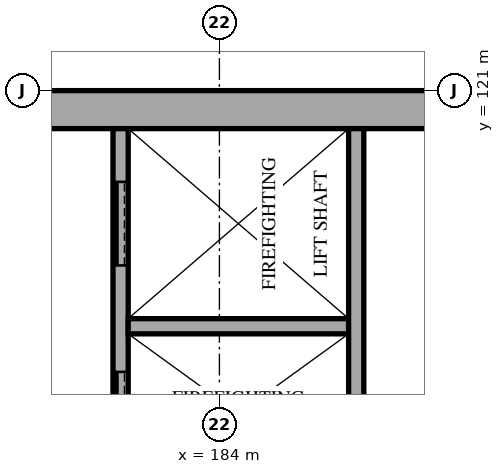
"""IFC4 building model, lengths in metres.
Left out: names, types, materials, properties, quantities, classifications, styles, units other than length and angle.
Written with IfcOpenShell. Run it as: python <this file> out.ifc"""

import sys

from ifc_helpers import new_model, si_unit, direction, frame, frame_2d, origin, place, context, subcontext, project, spatial, rectangle, extrude, element, fill, save


model = new_model("IFC4")
c1 = context("Model", 3, precision=1e-05, world=origin(), true_north=direction((0.0, 1.0)))
c2 = subcontext(c1, "Body", "Model", "MODEL_VIEW")
j1 = project(units=[si_unit("LENGTHUNIT", "METRE"), si_unit("PLANEANGLEUNIT", "RADIAN")], contexts=[c1])
p1 = place(None, origin())
s1 = spatial("IfcSite", under=j1, at=p1, CompositionType="ELEMENT")
p2 = place(p1, origin())
s2 = spatial("IfcBuilding", under=s1, at=p2, CompositionType="ELEMENT")
p3 = place(p2, origin())
s3 = spatial("IfcBuildingStorey", under=s2, at=p3, CompositionType="ELEMENT", Elevation=0.0)
p4 = place(p3, frame((172.0, 120.75, 0.0), z_axis=(0.0, 0.0, 1.0), x_axis=(1.0, 0.0, 0.0)))
e1 = element("IfcWall", 1, at=p4, inside=s3, PredefinedType="SHEAR", context=c2, shape_type="SweptSolid", body=[
    extrude(rectangle(XDim=18.0, YDim=0.5, at=frame_2d((9.0, 0.0))), origin(), (0.0, 0.0, 1.0), 5.0),
])
p5 = place(p4, frame((8.3, 0.0, 0.0)))
e2 = element("IfcOpeningElement", 2, at=p5, cuts=e1, PredefinedType="OPENING", context=c2, shape_type="SweptSolid", body=[
    extrude(rectangle(XDim=1.2, YDim=2.1, at=frame_2d((0.6, 1.05))), frame((0.0, 0.26, 0.0), z_axis=(0.0, -1.0, 0.0), x_axis=(1.0, 0.0, 0.0)), (0.0, 0.0, 1.0), 0.52),
])
p6 = place(p4, frame((15.2, 0.0, 0.0)))
e3 = element("IfcOpeningElement", 3, at=p6, cuts=e1, PredefinedType="OPENING", context=c2, shape_type="SweptSolid", body=[
    extrude(rectangle(XDim=1.0, YDim=2.1, at=frame_2d((0.5, 1.05))), frame((0.0, 0.26, 0.0), z_axis=(0.0, -1.0, 0.0), x_axis=(1.0, 0.0, 0.0)), (0.0, 0.0, 1.0), 0.52),
])
p7 = place(p3, frame((182.7, 115.7, 0.0), z_axis=(0.0, 0.0, 1.0), x_axis=(0.0, 1.0, 0.0)))
e4 = element("IfcWall", 4, at=p7, inside=s3, PredefinedType="SOLIDWALL", context=c2, shape_type="SweptSolid", body=[
    extrude(rectangle(XDim=4.8, YDim=0.2, at=frame_2d((2.4, 0.0))), origin(), (0.0, 0.0, 1.0), 4.8),
])
p8 = place(p7, frame((0.5, 0.0, 0.0)))
e5 = element("IfcOpeningElement", 5, at=p8, cuts=e4, PredefinedType="OPENING", context=c2, shape_type="SweptSolid", body=[
    extrude(rectangle(XDim=1.1, YDim=2.1, at=frame_2d((0.55, 1.05))), frame((0.0, 0.11, 0.0), z_axis=(0.0, -1.0, 0.0), x_axis=(1.0, 0.0, 0.0)), (0.0, 0.0, 1.0), 0.22),
])
p9 = place(p7, frame((3.0, 0.0, 0.0)))
e6 = element("IfcOpeningElement", 6, at=p9, cuts=e4, PredefinedType="OPENING", context=c2, shape_type="SweptSolid", body=[
    extrude(rectangle(XDim=1.1, YDim=2.1, at=frame_2d((0.55, 1.05))), frame((0.0, 0.11, 0.0), z_axis=(0.0, -1.0, 0.0), x_axis=(1.0, 0.0, 0.0)), (0.0, 0.0, 1.0), 0.22),
])
p10 = place(p3, frame((182.8, 117.9, 0.0), z_axis=(0.0, 0.0, 1.0), x_axis=(1.0, 0.0, 0.0)))
e7 = element("IfcWall", 7, at=p10, inside=s3, PredefinedType="SOLIDWALL", context=c2, shape_type="SweptSolid", body=[
    extrude(rectangle(XDim=2.9, YDim=0.2, at=frame_2d((1.45, 0.0))), origin(), (0.0, 0.0, 1.0), 4.8),
])
p11 = place(p3, frame((185.8, 115.7, 0.0), z_axis=(0.0, 0.0, 1.0), x_axis=(0.0, 1.0, 0.0)))
e8 = element("IfcWall", 8, at=p11, inside=s3, PredefinedType="SOLIDWALL", context=c2, shape_type="SweptSolid", body=[
    extrude(rectangle(XDim=4.8, YDim=0.2, at=frame_2d((2.4, 0.0))), origin(), (0.0, 0.0, 1.0), 4.8),
])
p12 = place(p8, origin())
e9 = element("IfcDoor", 9, at=p12, inside=s3, OperationType="SLIDING_TO_LEFT", PredefinedType="DOOR", context=c2, shape_type="SweptSolid", body=[
    extrude(rectangle(XDim=1.1, YDim=2.1, at=frame_2d((0.55, 1.05))), frame((0.0, 0.025, 0.0), z_axis=(0.0, -1.0, 0.0), x_axis=(1.0, 0.0, 0.0)), (0.0, 0.0, 1.0), 0.05),
])
fill(e5, e9)
p13 = place(p9, origin())
e10 = element("IfcDoor", 10, at=p13, inside=s3, OperationType="SLIDING_TO_LEFT", PredefinedType="DOOR", context=c2, shape_type="SweptSolid", body=[
    extrude(rectangle(XDim=1.1, YDim=2.1, at=frame_2d((0.55, 1.05))), frame((0.0, 0.025, 0.0), z_axis=(0.0, -1.0, 0.0), x_axis=(1.0, 0.0, 0.0)), (0.0, 0.0, 1.0), 0.05),
])
fill(e6, e10)
save(model, sys.argv[1])
